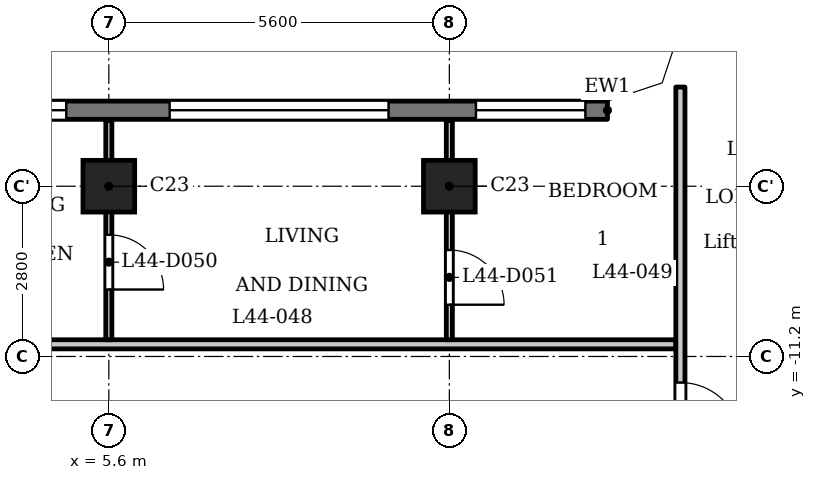
"""IFC4 building model, lengths in metres.
Left out: names, types, materials, properties, quantities, classifications, styles, units other than length and angle.
Written with IfcOpenShell. Run it as: python <this file> out.ifc"""

import sys

from ifc_helpers import new_model, si_unit, direction, frame, frame_2d, origin, origin_2d, place, context, subcontext, project, spatial, polyline, rectangle, outline, extrude, element, fill, save


model = new_model("IFC4")
c1 = context("Model", 3, precision=1e-05, world=origin(), true_north=direction((0.0, 1.0)))
c2 = subcontext(c1, "Body", "Model", "MODEL_VIEW")
j1 = project(units=[si_unit("LENGTHUNIT", "METRE"), si_unit("PLANEANGLEUNIT", "RADIAN")], contexts=[c1])
p1 = place(None, origin())
s1 = spatial("IfcSite", under=j1, at=p1, CompositionType="ELEMENT")
p2 = place(p1, origin())
s2 = spatial("IfcBuilding", under=s1, at=p2, CompositionType="ELEMENT")
p3 = place(p2, frame((0.0, 0.0, 171.1)))
s3 = spatial("IfcBuildingStorey", under=s2, at=p3, CompositionType="ELEMENT", Elevation=171.1)
for number, where, z_axis, x_axis in (
    (1, (5.6, -8.4, 0.0), (0.0, 0.0, 1.0), (1.0, 0.0, 0.0)),
    (2, (11.2, -8.4, 0.0), (0.0, 0.0, 1.0), (1.0, 0.0, 0.0)),
):
    element("IfcColumn", number, at=place(p3, frame(where, z_axis=z_axis, x_axis=x_axis)), inside=s3, PredefinedType="COLUMN", context=c2, shape_type="SweptSolid", body=[
        extrude(rectangle(XDim=0.85, YDim=0.85, at=origin_2d()), origin(), (0.0, 0.0, 1.0), 3.5),
    ])
p4 = place(p3, frame((13.8, -7.15, 0.0), z_axis=(0.0, 0.0, 1.0), x_axis=(-1.0, 0.0, 0.0)))
e3 = element("IfcWall", 3, at=p4, inside=s3, PredefinedType="SOLIDWALL", context=c2, shape_type="SweptSolid", body=[
    extrude(rectangle(XDim=27.6, YDim=0.3, at=frame_2d((13.8, 0.0))), origin(), (0.0, 0.0, 1.0), 3.2),
])
p5 = place(p4, frame((0.363, 0.0, 0.9)))
e4 = element("IfcOpeningElement", 4, at=p5, cuts=e3, PredefinedType="OPENING", context=c2, shape_type="SweptSolid", body=[
    extrude(rectangle(XDim=1.8, YDim=1.25, at=frame_2d((0.9, 0.625))), frame((0.0, 0.16, 0.0), z_axis=(0.0, -1.0, 0.0), x_axis=(1.0, 0.0, 0.0)), (0.0, 0.0, 1.0), 0.32),
])
p6 = place(p4, frame((3.6, 0.0, 1.2)))
e5 = element("IfcOpeningElement", 5, at=p6, cuts=e3, PredefinedType="OPENING", context=c2, shape_type="SweptSolid", body=[
    extrude(rectangle(XDim=3.6, YDim=0.95, at=frame_2d((1.8, 0.475))), frame((0.0, 0.16, 0.0), z_axis=(0.0, -1.0, 0.0), x_axis=(1.0, 0.0, 0.0)), (0.0, 0.0, 1.0), 0.32),
])
p7 = place(p4, frame((8.9, 0.0, 0.9)))
e6 = element("IfcOpeningElement", 6, at=p7, cuts=e3, PredefinedType="OPENING", context=c2, shape_type="SweptSolid", body=[
    extrude(rectangle(XDim=1.8, YDim=1.25, at=frame_2d((0.9, 0.625))), frame((0.0, 0.16, 0.0), z_axis=(0.0, -1.0, 0.0), x_axis=(1.0, 0.0, 0.0)), (0.0, 0.0, 1.0), 0.32),
])
p8 = place(p4, frame((12.0, 0.0, 0.6)))
e7 = element("IfcOpeningElement", 7, at=p8, cuts=e3, PredefinedType="OPENING", context=c2, shape_type="SweptSolid", body=[
    extrude(rectangle(XDim=1.2, YDim=1.55, at=frame_2d((0.6, 0.775))), frame((0.0, 0.16, 0.0), z_axis=(0.0, -1.0, 0.0), x_axis=(1.0, 0.0, 0.0)), (0.0, 0.0, 1.0), 0.32),
])
p9 = place(p4, frame((14.4, 0.0, 0.6)))
e8 = element("IfcOpeningElement", 8, at=p9, cuts=e3, PredefinedType="OPENING", context=c2, shape_type="SweptSolid", body=[
    extrude(rectangle(XDim=1.2, YDim=1.55, at=frame_2d((0.6, 0.775))), frame((0.0, 0.16, 0.0), z_axis=(0.0, -1.0, 0.0), x_axis=(1.0, 0.0, 0.0)), (0.0, 0.0, 1.0), 0.32),
])
p10 = place(p4, frame((16.9, 0.0, 0.9)))
e9 = element("IfcOpeningElement", 9, at=p10, cuts=e3, PredefinedType="OPENING", context=c2, shape_type="SweptSolid", body=[
    extrude(rectangle(XDim=1.8, YDim=1.25, at=frame_2d((0.9, 0.625))), frame((0.0, 0.16, 0.0), z_axis=(0.0, -1.0, 0.0), x_axis=(1.0, 0.0, 0.0)), (0.0, 0.0, 1.0), 0.32),
])
p11 = place(p4, frame((20.4, 0.0, 1.2)))
e10 = element("IfcOpeningElement", 10, at=p11, cuts=e3, PredefinedType="OPENING", context=c2, shape_type="SweptSolid", body=[
    extrude(rectangle(XDim=3.6, YDim=0.95, at=frame_2d((1.8, 0.475))), frame((0.0, 0.16, 0.0), z_axis=(0.0, -1.0, 0.0), x_axis=(1.0, 0.0, 0.0)), (0.0, 0.0, 1.0), 0.32),
])
p12 = place(p4, frame((25.438, 0.0, 0.9)))
e11 = element("IfcOpeningElement", 11, at=p12, cuts=e3, PredefinedType="OPENING", context=c2, shape_type="SweptSolid", body=[
    extrude(rectangle(XDim=1.8, YDim=1.25, at=frame_2d((0.9, 0.625))), frame((0.0, 0.16, 0.0), z_axis=(0.0, -1.0, 0.0), x_axis=(1.0, 0.0, 0.0)), (0.0, 0.0, 1.0), 0.32),
])
p13 = place(p3, frame((-14.925, -11.0, 0.0), z_axis=(0.0, 0.0, 1.0), x_axis=(1.0, 0.0, 0.0)))
e12 = element("IfcWall", 12, at=p13, inside=s3, PredefinedType="PARTITIONING", context=c2, shape_type="SweptSolid", body=[
    extrude(rectangle(XDim=29.85, YDim=0.15, at=frame_2d((14.925, 0.0))), origin(), (0.0, 0.0, 1.0), 3.2),
])
p14 = place(p13, frame((9.875, 0.0, 0.0)))
e13 = element("IfcOpeningElement", 13, at=p14, cuts=e12, PredefinedType="OPENING", context=c2, shape_type="SweptSolid", body=[
    extrude(rectangle(XDim=1.0, YDim=2.1, at=frame_2d((0.5, 1.05))), frame((0.0, 0.085, 0.0), z_axis=(0.0, -1.0, 0.0), x_axis=(1.0, 0.0, 0.0)), (0.0, 0.0, 1.0), 0.17),
])
p15 = place(p13, frame((17.875, 0.0, 0.0)))
e14 = element("IfcOpeningElement", 14, at=p15, cuts=e12, PredefinedType="OPENING", context=c2, shape_type="SweptSolid", body=[
    extrude(rectangle(XDim=1.0, YDim=2.1, at=frame_2d((0.5, 1.05))), frame((0.0, 0.085, 0.0), z_axis=(0.0, -1.0, 0.0), x_axis=(1.0, 0.0, 0.0)), (0.0, 0.0, 1.0), 0.17),
])
p16 = place(p3, frame((5.6, -10.925, 0.0), z_axis=(0.0, 0.0, 1.0), x_axis=(0.0, 1.0, 0.0)))
e15 = element("IfcWall", 15, at=p16, inside=s3, PredefinedType="PARTITIONING", context=c2, shape_type="SweptSolid", body=[
    extrude(rectangle(XDim=3.605, YDim=0.1, at=frame_2d((1.802, 0.0))), origin(), (0.0, 0.0, 1.0), 3.2),
])
p17 = place(p16, frame((0.826, 0.0, 0.0)))
e16 = element("IfcOpeningElement", 16, at=p17, cuts=e15, PredefinedType="OPENING", context=c2, shape_type="SweptSolid", body=[
    extrude(rectangle(XDim=0.9, YDim=2.1, at=frame_2d((0.45, 1.05))), frame((0.0, 0.06, 0.0), z_axis=(0.0, -1.0, 0.0), x_axis=(1.0, 0.0, 0.0)), (0.0, 0.0, 1.0), 0.12),
])
p18 = place(p3, frame((11.2, -10.925, 0.0), z_axis=(0.0, 0.0, 1.0), x_axis=(0.0, 1.0, 0.0)))
e17 = element("IfcWall", 17, at=p18, inside=s3, PredefinedType="PARTITIONING", context=c2, shape_type="SweptSolid", body=[
    extrude(rectangle(XDim=3.605, YDim=0.1, at=frame_2d((1.802, 0.0))), origin(), (0.0, 0.0, 1.0), 3.2),
])
p19 = place(p18, frame((0.576, 0.0, 0.0)))
e18 = element("IfcOpeningElement", 18, at=p19, cuts=e17, PredefinedType="OPENING", context=c2, shape_type="SweptSolid", body=[
    extrude(rectangle(XDim=0.9, YDim=2.1, at=frame_2d((0.45, 1.05))), frame((0.0, 0.06, 0.0), z_axis=(0.0, -1.0, 0.0), x_axis=(1.0, 0.0, 0.0)), (0.0, 0.0, 1.0), 0.12),
])
p20 = place(p3, frame((15.0, -13.125, 0.0), z_axis=(0.0, 0.0, 1.0), x_axis=(0.0, 1.0, 0.0)))
e19 = element("IfcWall", 19, at=p20, inside=s3, PredefinedType="PARTITIONING", context=c2, shape_type="SweptSolid", body=[
    extrude(rectangle(XDim=6.356, YDim=0.15, at=frame_2d((3.178, 0.0))), origin(), (0.0, 0.0, 1.0), 3.2),
])
p21 = place(p20, frame((0.496, 0.0, 0.0)))
e20 = element("IfcOpeningElement", 20, at=p21, cuts=e19, PredefinedType="OPENING", context=c2, shape_type="SweptSolid", body=[
    extrude(rectangle(XDim=1.0, YDim=2.1, at=frame_2d((0.5, 1.05))), frame((0.0, 0.085, 0.0), z_axis=(0.0, -1.0, 0.0), x_axis=(1.0, 0.0, 0.0)), (0.0, 0.0, 1.0), 0.17),
])
p22 = place(p3, origin())
e21 = element("IfcWall", 21, at=p22, inside=s3, PredefinedType="SOLIDWALL", context=c2, shape_type="SweptSolid", body=[
    extrude(outline(polyline([(14.937, -6.937), (15.3, -5.849), (15.3, -5.8), (15.0, -5.8), (14.7, -6.7), (13.8, -7.0), (13.8, -7.3), (13.849, -7.3), (14.937, -6.937)])), origin(), (0.0, 0.0, 1.0), 3.2),
])
p23 = place(p21, origin())
e22 = element("IfcDoor", 22, at=p23, inside=s3, OperationType="SINGLE_SWING_LEFT", PredefinedType="DOOR", context=c2, shape_type="SweptSolid", body=[
    extrude(rectangle(XDim=1.0, YDim=2.1, at=frame_2d((0.5, 1.05))), frame((0.0, 0.025, 0.0), z_axis=(0.0, -1.0, 0.0), x_axis=(1.0, 0.0, 0.0)), (0.0, 0.0, 1.0), 0.05),
])
fill(e20, e22)
p24 = place(p17, origin())
e23 = element("IfcDoor", 23, at=p24, inside=s3, OperationType="SINGLE_SWING_LEFT", PredefinedType="DOOR", context=c2, shape_type="SweptSolid", body=[
    extrude(rectangle(XDim=0.9, YDim=2.1, at=frame_2d((0.45, 1.05))), frame((0.0, 0.025, 0.0), z_axis=(0.0, -1.0, 0.0), x_axis=(1.0, 0.0, 0.0)), (0.0, 0.0, 1.0), 0.05),
])
fill(e16, e23)
p25 = place(p19, origin())
e24 = element("IfcDoor", 24, at=p25, inside=s3, OperationType="SINGLE_SWING_LEFT", PredefinedType="DOOR", context=c2, shape_type="SweptSolid", body=[
    extrude(rectangle(XDim=0.9, YDim=2.1, at=frame_2d((0.45, 1.05))), frame((0.0, 0.025, 0.0), z_axis=(0.0, -1.0, 0.0), x_axis=(1.0, 0.0, 0.0)), (0.0, 0.0, 1.0), 0.05),
])
fill(e18, e24)
p26 = place(p5, origin())
e25 = element("IfcWindow", 25, at=p26, inside=s3, PartitioningType="SINGLE_PANEL", PredefinedType="WINDOW", context=c2, shape_type="SweptSolid", body=[
    extrude(rectangle(XDim=1.8, YDim=1.25, at=frame_2d((0.9, 0.625))), frame((0.0, 0.03, 0.0), z_axis=(0.0, -1.0, 0.0), x_axis=(1.0, 0.0, 0.0)), (0.0, 0.0, 1.0), 0.06),
])
fill(e4, e25)
p27 = place(p6, origin())
e26 = element("IfcWindow", 26, at=p27, inside=s3, PartitioningType="SINGLE_PANEL", PredefinedType="WINDOW", context=c2, shape_type="SweptSolid", body=[
    extrude(rectangle(XDim=3.6, YDim=0.95, at=frame_2d((1.8, 0.475))), frame((0.0, 0.03, 0.0), z_axis=(0.0, -1.0, 0.0), x_axis=(1.0, 0.0, 0.0)), (0.0, 0.0, 1.0), 0.06),
])
fill(e5, e26)
p28 = place(p7, origin())
e27 = element("IfcWindow", 27, at=p28, inside=s3, PartitioningType="SINGLE_PANEL", PredefinedType="WINDOW", context=c2, shape_type="SweptSolid", body=[
    extrude(rectangle(XDim=1.8, YDim=1.25, at=frame_2d((0.9, 0.625))), frame((0.0, 0.03, 0.0), z_axis=(0.0, -1.0, 0.0), x_axis=(1.0, 0.0, 0.0)), (0.0, 0.0, 1.0), 0.06),
])
fill(e6, e27)
save(model, sys.argv[1])
